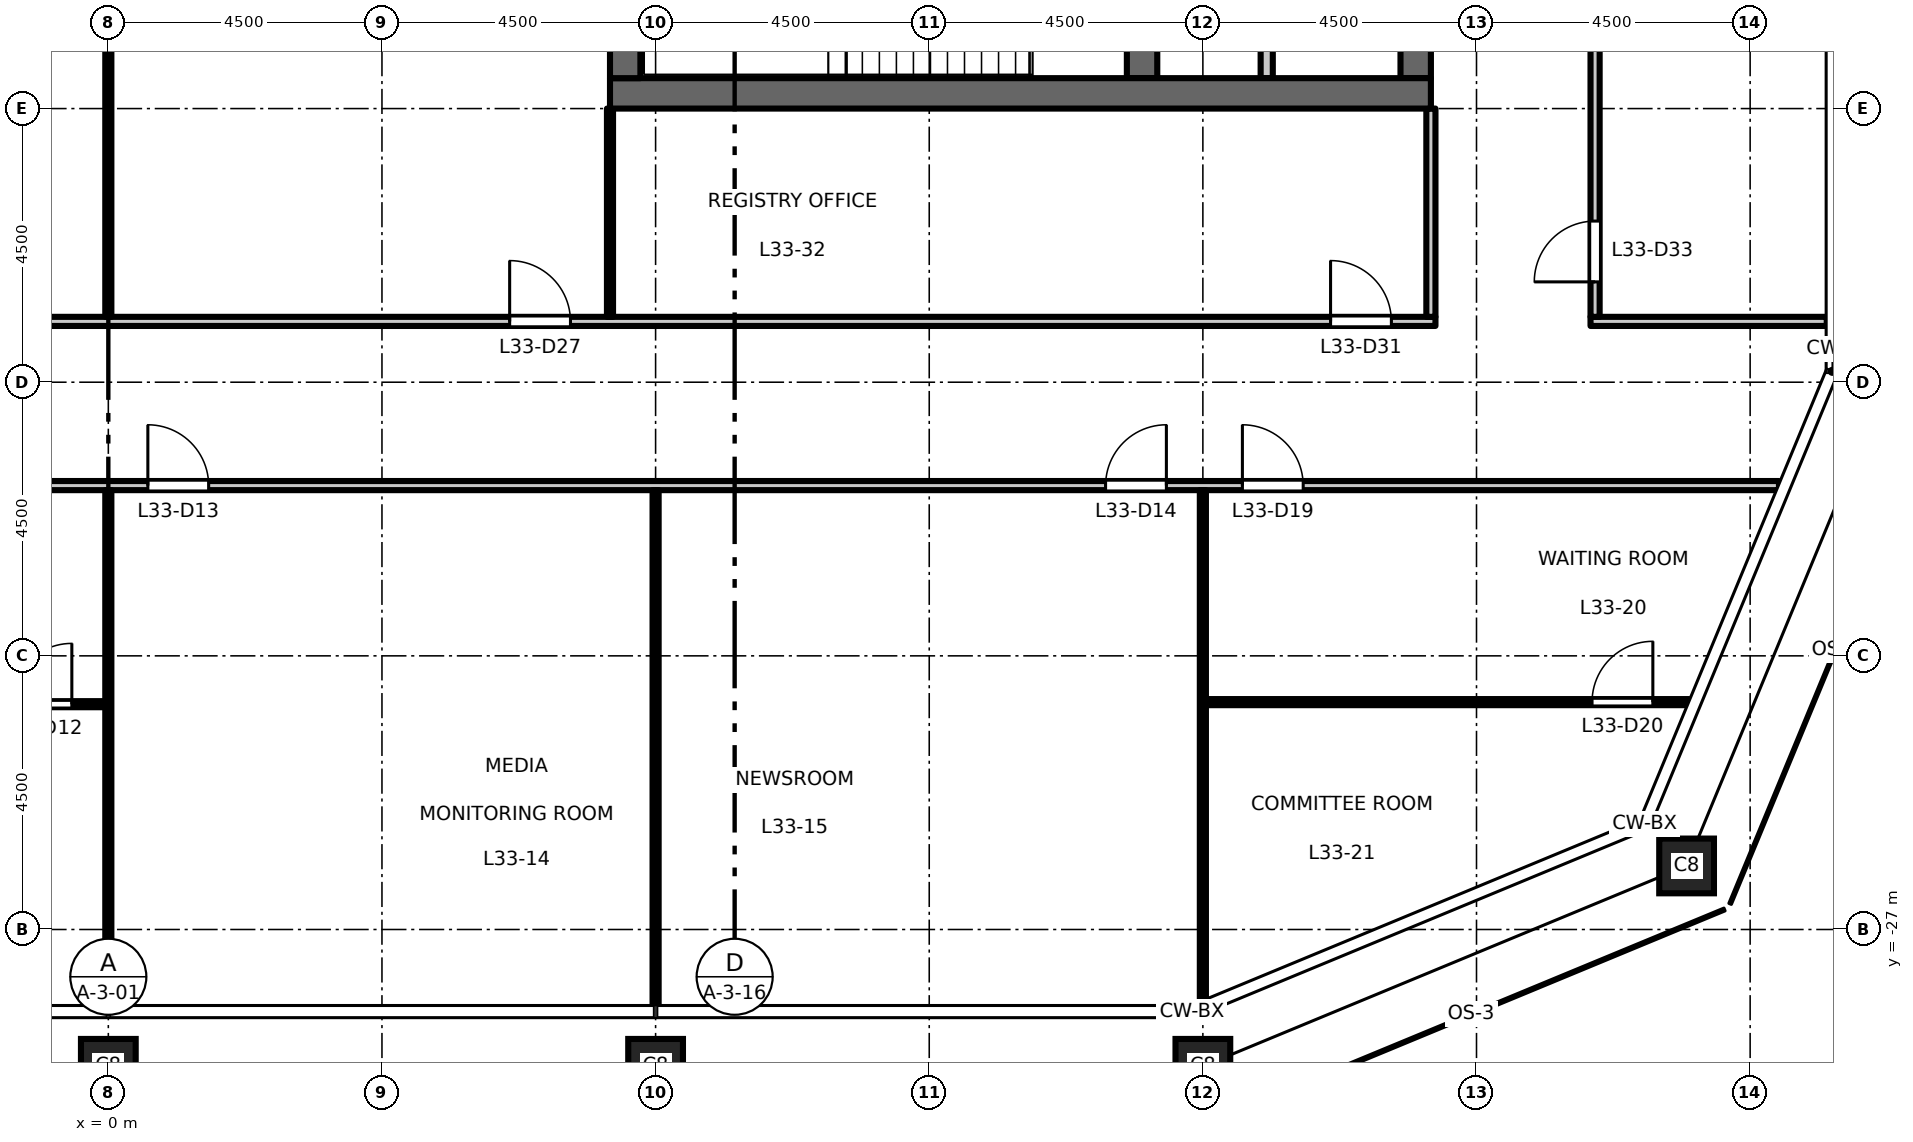
"""IFC4 building model, lengths in metres.
Left out: names, types, materials, properties, quantities, classifications, styles, units other than length and angle.
Written with IfcOpenShell. Run it as: python <this file> out.ifc"""

import sys

from ifc_helpers import new_model, si_unit, direction, frame, frame_2d, origin, origin_2d, place, context, subcontext, project, spatial, rectangle, hollow_rectangle, extrude, element, fill, save


model = new_model("IFC4")
c1 = context("Model", 3, precision=1e-05, world=origin(), true_north=direction((0.0, 1.0)))
c2 = subcontext(c1, "Body", "Model", "MODEL_VIEW")
j1 = project(units=[si_unit("LENGTHUNIT", "METRE"), si_unit("PLANEANGLEUNIT", "RADIAN")], contexts=[c1])
p1 = place(None, origin())
s1 = spatial("IfcSite", under=j1, at=p1, CompositionType="ELEMENT")
p2 = place(p1, origin())
s2 = spatial("IfcBuilding", under=s1, at=p2, CompositionType="ELEMENT")
p3 = place(p2, frame((0.0, 0.0, 154.2)))
s3 = spatial("IfcBuildingStorey", under=s2, at=p3, CompositionType="ELEMENT", Elevation=154.2)
for number, where, z_axis, x_axis in (
    (1, (0.0, -29.25, 0.0), (0.0, 0.0, 1.0), (1.0, 0.0, 0.0)),
    (2, (9.0, -29.25, 0.0), (0.0, 0.0, 1.0), (1.0, 0.0, 0.0)),
    (3, (18.0, -29.25, 0.0), (0.0, 0.0, 1.0), (1.0, 0.0, 0.0)),
    (4, (25.955, -25.955, 0.0), (0.0, 0.0, 1.0), (1.0, 0.0, 0.0)),
):
    element("IfcColumn", number, at=place(p3, frame(where, z_axis=z_axis, x_axis=x_axis)), inside=s3, PredefinedType="COLUMN", context=c2, shape_type="SweptSolid", body=[
        extrude(hollow_rectangle(XDim=0.9, YDim=0.9, WallThickness=0.05, at=origin_2d()), origin(), (0.0, 0.0, 1.0), 4.5),
    ])
p4 = place(p3, frame((21.5, -13.0, 0.0), z_axis=(0.0, 0.0, 1.0), x_axis=(0.0, 1.0, 0.0)))
e5 = element("IfcWall", 5, at=p4, inside=s3, PredefinedType="SHEAR", context=c2, shape_type="SweptSolid", body=[
    extrude(rectangle(XDim=26.0, YDim=0.5, at=frame_2d((13.0, 0.0))), origin(), (0.0, 0.0, 1.0), 4.35),
])
p5 = place(p4, frame((16.825, 0.0, 0.0)))
e6 = element("IfcOpeningElement", 6, at=p5, cuts=e5, PredefinedType="OPENING", context=c2, shape_type="SweptSolid", body=[
    extrude(rectangle(XDim=1.8, YDim=2.1, at=frame_2d((0.9, 1.05))), frame((0.0, 0.26, 0.0), z_axis=(0.0, -1.0, 0.0), x_axis=(1.0, 0.0, 0.0)), (0.0, 0.0, 1.0), 0.52),
])
p6 = place(p4, frame((7.375, 0.0, 0.0)))
e7 = element("IfcOpeningElement", 7, at=p6, cuts=e5, PredefinedType="OPENING", context=c2, shape_type="SweptSolid", body=[
    extrude(rectangle(XDim=1.8, YDim=2.1, at=frame_2d((0.9, 1.05))), frame((0.0, 0.26, 0.0), z_axis=(0.0, -1.0, 0.0), x_axis=(1.0, 0.0, 0.0)), (0.0, 0.0, 1.0), 0.52),
])
p7 = place(p4, frame((23.8, 0.0, 0.0)))
e8 = element("IfcOpeningElement", 8, at=p7, cuts=e5, PredefinedType="OPENING", context=c2, shape_type="SweptSolid", body=[
    extrude(rectangle(XDim=0.9, YDim=2.1, at=frame_2d((0.45, 1.05))), frame((0.0, 0.26, 0.0), z_axis=(0.0, -1.0, 0.0), x_axis=(1.0, 0.0, 0.0)), (0.0, 0.0, 1.0), 0.52),
])
p8 = place(p3, frame((19.05, -13.0, 0.0), z_axis=(0.0, 0.0, 1.0), x_axis=(0.0, 1.0, 0.0)))
e9 = element("IfcWall", 9, at=p8, inside=s3, PredefinedType="PARTITIONING", context=c2, shape_type="SweptSolid", body=[
    extrude(rectangle(XDim=6.575, YDim=0.2, at=frame_2d((3.288, 0.0))), origin(), (0.0, 0.0, 1.0), 4.35),
])
p9 = place(p3, frame((17.0, -13.0, 0.0), z_axis=(0.0, 0.0, 1.0), x_axis=(0.0, 1.0, 0.0)))
e10 = element("IfcWall", 10, at=p9, inside=s3, PredefinedType="SHEAR", context=c2, shape_type="SweptSolid", body=[
    extrude(rectangle(XDim=6.575, YDim=0.5, at=frame_2d((3.288, 0.0))), origin(), (0.0, 0.0, 1.0), 4.35),
])
p10 = place(p3, frame((8.25, -13.25, 0.0), z_axis=(0.0, 0.0, 1.0), x_axis=(1.0, 0.0, 0.0)))
e11 = element("IfcWall", 11, at=p10, inside=s3, PredefinedType="SHEAR", context=c2, shape_type="SweptSolid", body=[
    extrude(rectangle(XDim=13.5, YDim=0.5, at=frame_2d((6.75, 0.0))), origin(), (0.0, 0.0, 1.0), 4.35),
])
p11 = place(p3, frame((8.5, -13.0, 0.0), z_axis=(0.0, 0.0, 1.0), x_axis=(0.0, 1.0, 0.0)))
e12 = element("IfcWall", 12, at=p11, inside=s3, PredefinedType="SHEAR", context=c2, shape_type="SweptSolid", body=[
    extrude(rectangle(XDim=26.0, YDim=0.5, at=frame_2d((13.0, 0.0))), origin(), (0.0, 0.0, 1.0), 4.35),
])
p12 = place(p3, frame((-8.95, -23.295, 0.0), z_axis=(0.0, 0.0, 1.0), x_axis=(1.0, 0.0, 0.0)))
e13 = element("IfcWall", 13, at=p12, inside=s3, PredefinedType="PARTITIONING", context=c2, shape_type="SweptSolid", body=[
    extrude(rectangle(XDim=8.9, YDim=0.1, at=frame_2d((4.45, 0.0))), origin(), (0.0, 0.0, 1.0), 4.35),
])
p13 = place(p12, frame((7.35, 0.0, 0.0)))
e14 = element("IfcOpeningElement", 14, at=p13, cuts=e13, PredefinedType="OPENING", context=c2, shape_type="SweptSolid", body=[
    extrude(rectangle(XDim=1.0, YDim=2.1, at=frame_2d((0.5, 1.05))), frame((0.0, 0.06, 0.0), z_axis=(0.0, -1.0, 0.0), x_axis=(1.0, 0.0, 0.0)), (0.0, 0.0, 1.0), 0.12),
])
p14 = place(p3, frame((18.05, -23.261, 0.0), z_axis=(0.0, 0.0, 1.0), x_axis=(1.0, 0.0, 0.0)))
e15 = element("IfcWall", 15, at=p14, inside=s3, PredefinedType="PARTITIONING", context=c2, shape_type="SweptSolid", body=[
    extrude(rectangle(XDim=7.949, YDim=0.1, at=frame_2d((3.975, 0.0))), origin(), (0.0, 0.0, 1.0), 4.35),
])
p15 = place(p14, frame((6.35, 0.0, 0.0)))
e16 = element("IfcOpeningElement", 16, at=p15, cuts=e15, PredefinedType="OPENING", context=c2, shape_type="SweptSolid", body=[
    extrude(rectangle(XDim=1.0, YDim=2.1, at=frame_2d((0.5, 1.05))), frame((0.0, 0.06, 0.0), z_axis=(0.0, -1.0, 0.0), x_axis=(1.0, 0.0, 0.0)), (0.0, 0.0, 1.0), 0.12),
])
p16 = place(p3, frame((-27.474, -19.7, 0.0), z_axis=(0.0, 0.0, 1.0), x_axis=(1.0, 0.0, 0.0)))
e17 = element("IfcWall", 17, at=p16, inside=s3, PredefinedType="PARTITIONING", context=c2, shape_type="SweptSolid", body=[
    extrude(rectangle(XDim=54.948, YDim=0.15, at=frame_2d((27.474, 0.0))), origin(), (0.0, 0.0, 1.0), 4.35),
])
p17 = place(p16, frame((10.124, 0.0, 0.0)))
e18 = element("IfcOpeningElement", 18, at=p17, cuts=e17, PredefinedType="OPENING", context=c2, shape_type="SweptSolid", body=[
    extrude(rectangle(XDim=1.0, YDim=2.1, at=frame_2d((0.5, 1.05))), frame((0.0, 0.085, 0.0), z_axis=(0.0, -1.0, 0.0), x_axis=(1.0, 0.0, 0.0)), (0.0, 0.0, 1.0), 0.17),
])
p18 = place(p16, frame((19.124, 0.0, 0.0)))
e19 = element("IfcOpeningElement", 19, at=p18, cuts=e17, PredefinedType="OPENING", context=c2, shape_type="SweptSolid", body=[
    extrude(rectangle(XDim=1.0, YDim=2.1, at=frame_2d((0.5, 1.05))), frame((0.0, 0.085, 0.0), z_axis=(0.0, -1.0, 0.0), x_axis=(1.0, 0.0, 0.0)), (0.0, 0.0, 1.0), 0.17),
])
p19 = place(p16, frame((28.124, 0.0, 0.0)))
e20 = element("IfcOpeningElement", 20, at=p19, cuts=e17, PredefinedType="OPENING", context=c2, shape_type="SweptSolid", body=[
    extrude(rectangle(XDim=1.0, YDim=2.1, at=frame_2d((0.5, 1.05))), frame((0.0, 0.085, 0.0), z_axis=(0.0, -1.0, 0.0), x_axis=(1.0, 0.0, 0.0)), (0.0, 0.0, 1.0), 0.17),
])
p20 = place(p16, frame((43.874, 0.0, 0.0)))
e21 = element("IfcOpeningElement", 21, at=p20, cuts=e17, PredefinedType="OPENING", context=c2, shape_type="SweptSolid", body=[
    extrude(rectangle(XDim=1.0, YDim=2.1, at=frame_2d((0.5, 1.05))), frame((0.0, 0.085, 0.0), z_axis=(0.0, -1.0, 0.0), x_axis=(1.0, 0.0, 0.0)), (0.0, 0.0, 1.0), 0.17),
])
p21 = place(p16, frame((0.65, 0.0, 0.0)))
e22 = element("IfcOpeningElement", 22, at=p21, cuts=e17, PredefinedType="OPENING", context=c2, shape_type="SweptSolid", body=[
    extrude(rectangle(XDim=1.0, YDim=2.1, at=frame_2d((0.5, 1.05))), frame((0.0, 0.085, 0.0), z_axis=(0.0, -1.0, 0.0), x_axis=(1.0, 0.0, 0.0)), (0.0, 0.0, 1.0), 0.17),
])
p22 = place(p16, frame((46.124, 0.0, 0.0)))
e23 = element("IfcOpeningElement", 23, at=p22, cuts=e17, PredefinedType="OPENING", context=c2, shape_type="SweptSolid", body=[
    extrude(rectangle(XDim=1.0, YDim=2.1, at=frame_2d((0.5, 1.05))), frame((0.0, 0.085, 0.0), z_axis=(0.0, -1.0, 0.0), x_axis=(1.0, 0.0, 0.0)), (0.0, 0.0, 1.0), 0.17),
])
p23 = place(p3, frame((-21.825, -17.0, 0.0), z_axis=(0.0, 0.0, 1.0), x_axis=(1.0, 0.0, 0.0)))
e24 = element("IfcWall", 24, at=p23, inside=s3, PredefinedType="PARTITIONING", context=c2, shape_type="SweptSolid", body=[
    extrude(rectangle(XDim=43.65, YDim=0.15, at=frame_2d((21.825, 0.0))), origin(), (0.0, 0.0, 1.0), 4.35),
])
p24 = place(p23, frame((14.175, 0.0, 0.0)))
e25 = element("IfcOpeningElement", 25, at=p24, cuts=e24, PredefinedType="OPENING", context=c2, shape_type="SweptSolid", body=[
    extrude(rectangle(XDim=1.0, YDim=2.1, at=frame_2d((0.5, 1.05))), frame((0.0, 0.085, 0.0), z_axis=(0.0, -1.0, 0.0), x_axis=(1.0, 0.0, 0.0)), (0.0, 0.0, 1.0), 0.17),
])
p25 = place(p23, frame((28.425, 0.0, 0.0)))
e26 = element("IfcOpeningElement", 26, at=p25, cuts=e24, PredefinedType="OPENING", context=c2, shape_type="SweptSolid", body=[
    extrude(rectangle(XDim=1.0, YDim=2.1, at=frame_2d((0.5, 1.05))), frame((0.0, 0.085, 0.0), z_axis=(0.0, -1.0, 0.0), x_axis=(1.0, 0.0, 0.0)), (0.0, 0.0, 1.0), 0.17),
])
p26 = place(p23, frame((0.675, 0.0, 0.0)))
e27 = element("IfcOpeningElement", 27, at=p26, cuts=e24, PredefinedType="OPENING", context=c2, shape_type="SweptSolid", body=[
    extrude(rectangle(XDim=1.0, YDim=2.1, at=frame_2d((0.5, 1.05))), frame((0.0, 0.085, 0.0), z_axis=(0.0, -1.0, 0.0), x_axis=(1.0, 0.0, 0.0)), (0.0, 0.0, 1.0), 0.17),
])
p27 = place(p23, frame((41.925, 0.0, 0.0)))
e28 = element("IfcOpeningElement", 28, at=p27, cuts=e24, PredefinedType="OPENING", context=c2, shape_type="SweptSolid", body=[
    extrude(rectangle(XDim=1.0, YDim=2.1, at=frame_2d((0.5, 1.05))), frame((0.0, 0.085, 0.0), z_axis=(0.0, -1.0, 0.0), x_axis=(1.0, 0.0, 0.0)), (0.0, 0.0, 1.0), 0.17),
])
p28 = place(p3, frame((24.375, -17.0, 0.0), z_axis=(0.0, 0.0, 1.0), x_axis=(1.0, 0.0, 0.0)))
e29 = element("IfcWall", 29, at=p28, inside=s3, PredefinedType="PARTITIONING", context=c2, shape_type="SweptSolid", body=[
    extrude(rectangle(XDim=3.885, YDim=0.15, at=frame_2d((1.942, 0.0))), origin(), (0.0, 0.0, 1.0), 4.35),
])
p29 = place(p3, frame((0.0, -28.26, 0.0), z_axis=(0.0, 0.0, 1.0), x_axis=(0.0, 1.0, 0.0)))
e30 = element("IfcWall", 30, at=p29, inside=s3, PredefinedType="PARTITIONING", context=c2, shape_type="SweptSolid", body=[
    extrude(rectangle(XDim=8.485, YDim=0.1, at=frame_2d((4.243, 0.0))), origin(), (0.0, 0.0, 1.0), 3.45),
])
p30 = place(p3, frame((0.0, -16.925, 0.0), z_axis=(0.0, 0.0, 1.0), x_axis=(0.0, 1.0, 0.0)))
e31 = element("IfcWall", 31, at=p30, inside=s3, PredefinedType="PARTITIONING", context=c2, shape_type="SweptSolid", body=[
    extrude(rectangle(XDim=8.275, YDim=0.1, at=frame_2d((4.138, 0.0))), origin(), (0.0, 0.0, 1.0), 3.45),
])
p31 = place(p3, frame((8.25, -16.925, 0.0), z_axis=(0.0, 0.0, 1.0), x_axis=(0.0, 1.0, 0.0)))
e32 = element("IfcWall", 32, at=p31, inside=s3, PredefinedType="PARTITIONING", context=c2, shape_type="SweptSolid", body=[
    extrude(rectangle(XDim=3.425, YDim=0.1, at=frame_2d((1.712, 0.0))), origin(), (0.0, 0.0, 1.0), 4.35),
])
p32 = place(p3, frame((9.0, -28.26, 0.0), z_axis=(0.0, 0.0, 1.0), x_axis=(0.0, 1.0, 0.0)))
e33 = element("IfcWall", 33, at=p32, inside=s3, PredefinedType="PARTITIONING", context=c2, shape_type="SweptSolid", body=[
    extrude(rectangle(XDim=8.485, YDim=0.1, at=frame_2d((4.243, 0.0))), origin(), (0.0, 0.0, 1.0), 3.45),
])
p33 = place(p3, frame((18.0, -28.178, 0.0), z_axis=(0.0, 0.0, 1.0), x_axis=(0.0, 1.0, 0.0)))
e34 = element("IfcWall", 34, at=p33, inside=s3, PredefinedType="PARTITIONING", context=c2, shape_type="SweptSolid", body=[
    extrude(rectangle(XDim=8.403, YDim=0.1, at=frame_2d((4.202, 0.0))), origin(), (0.0, 0.0, 1.0), 3.45),
])
p34 = place(p3, frame((21.75, -16.925, 0.0), z_axis=(0.0, 0.0, 1.0), x_axis=(0.0, 1.0, 0.0)))
e35 = element("IfcWall", 35, at=p34, inside=s3, PredefinedType="PARTITIONING", context=c2, shape_type="SweptSolid", body=[
    extrude(rectangle(XDim=3.425, YDim=0.15, at=frame_2d((1.712, 0.0))), origin(), (0.0, 0.0, 1.0), 4.35),
])
p35 = place(p3, frame((24.45, -16.925, 0.0), z_axis=(0.0, 0.0, 1.0), x_axis=(0.0, 1.0, 0.0)))
e36 = element("IfcWall", 36, at=p35, inside=s3, PredefinedType="PARTITIONING", context=c2, shape_type="SweptSolid", body=[
    extrude(rectangle(XDim=33.85, YDim=0.15, at=frame_2d((16.925, 0.0))), origin(), (0.0, 0.0, 1.0), 4.35),
])
p36 = place(p35, frame((0.575, 0.0, 0.0)))
e37 = element("IfcOpeningElement", 37, at=p36, cuts=e36, PredefinedType="OPENING", context=c2, shape_type="SweptSolid", body=[
    extrude(rectangle(XDim=1.0, YDim=2.1, at=frame_2d((0.5, 1.05))), frame((0.0, 0.085, 0.0), z_axis=(0.0, -1.0, 0.0), x_axis=(1.0, 0.0, 0.0)), (0.0, 0.0, 1.0), 0.17),
])
p37 = place(p13, origin())
e38 = element("IfcDoor", 38, at=p37, inside=s3, OperationType="SINGLE_SWING_RIGHT", PredefinedType="DOOR", context=c2, shape_type="SweptSolid", body=[
    extrude(rectangle(XDim=1.0, YDim=2.1, at=frame_2d((0.5, 1.05))), frame((0.0, 0.025, 0.0), z_axis=(0.0, -1.0, 0.0), x_axis=(1.0, 0.0, 0.0)), (0.0, 0.0, 1.0), 0.05),
])
fill(e14, e38)
p38 = place(p19, origin())
e39 = element("IfcDoor", 39, at=p38, inside=s3, OperationType="SINGLE_SWING_LEFT", PredefinedType="DOOR", context=c2, shape_type="SweptSolid", body=[
    extrude(rectangle(XDim=1.0, YDim=2.1, at=frame_2d((0.5, 1.05))), frame((0.0, 0.025, 0.0), z_axis=(0.0, -1.0, 0.0), x_axis=(1.0, 0.0, 0.0)), (0.0, 0.0, 1.0), 0.05),
])
fill(e20, e39)
p39 = place(p20, origin())
e40 = element("IfcDoor", 40, at=p39, inside=s3, OperationType="SINGLE_SWING_RIGHT", PredefinedType="DOOR", context=c2, shape_type="SweptSolid", body=[
    extrude(rectangle(XDim=1.0, YDim=2.1, at=frame_2d((0.5, 1.05))), frame((0.0, 0.025, 0.0), z_axis=(0.0, -1.0, 0.0), x_axis=(1.0, 0.0, 0.0)), (0.0, 0.0, 1.0), 0.05),
])
fill(e21, e40)
p40 = place(p22, origin())
e41 = element("IfcDoor", 41, at=p40, inside=s3, OperationType="SINGLE_SWING_LEFT", PredefinedType="DOOR", context=c2, shape_type="SweptSolid", body=[
    extrude(rectangle(XDim=1.0, YDim=2.1, at=frame_2d((0.5, 1.05))), frame((0.0, 0.025, 0.0), z_axis=(0.0, -1.0, 0.0), x_axis=(1.0, 0.0, 0.0)), (0.0, 0.0, 1.0), 0.05),
])
fill(e23, e41)
p41 = place(p15, origin())
e42 = element("IfcDoor", 42, at=p41, inside=s3, OperationType="SINGLE_SWING_RIGHT", PredefinedType="DOOR", context=c2, shape_type="SweptSolid", body=[
    extrude(rectangle(XDim=1.0, YDim=2.1, at=frame_2d((0.5, 1.05))), frame((0.0, 0.025, 0.0), z_axis=(0.0, -1.0, 0.0), x_axis=(1.0, 0.0, 0.0)), (0.0, 0.0, 1.0), 0.05),
])
fill(e16, e42)
p42 = place(p25, origin())
e43 = element("IfcDoor", 43, at=p42, inside=s3, OperationType="SINGLE_SWING_LEFT", PredefinedType="DOOR", context=c2, shape_type="SweptSolid", body=[
    extrude(rectangle(XDim=1.0, YDim=2.1, at=frame_2d((0.5, 1.05))), frame((0.0, 0.025, 0.0), z_axis=(0.0, -1.0, 0.0), x_axis=(1.0, 0.0, 0.0)), (0.0, 0.0, 1.0), 0.05),
])
fill(e26, e43)
p43 = place(p27, origin())
e44 = element("IfcDoor", 44, at=p43, inside=s3, OperationType="SINGLE_SWING_LEFT", PredefinedType="DOOR", context=c2, shape_type="SweptSolid", body=[
    extrude(rectangle(XDim=1.0, YDim=2.1, at=frame_2d((0.5, 1.05))), frame((0.0, 0.025, 0.0), z_axis=(0.0, -1.0, 0.0), x_axis=(1.0, 0.0, 0.0)), (0.0, 0.0, 1.0), 0.05),
])
fill(e28, e44)
p44 = place(p36, origin())
e45 = element("IfcDoor", 45, at=p44, inside=s3, OperationType="SINGLE_SWING_LEFT", PredefinedType="DOOR", context=c2, shape_type="SweptSolid", body=[
    extrude(rectangle(XDim=1.0, YDim=2.1, at=frame_2d((0.5, 1.05))), frame((0.0, 0.025, 0.0), z_axis=(0.0, -1.0, 0.0), x_axis=(1.0, 0.0, 0.0)), (0.0, 0.0, 1.0), 0.05),
])
fill(e37, e45)
save(model, sys.argv[1])
